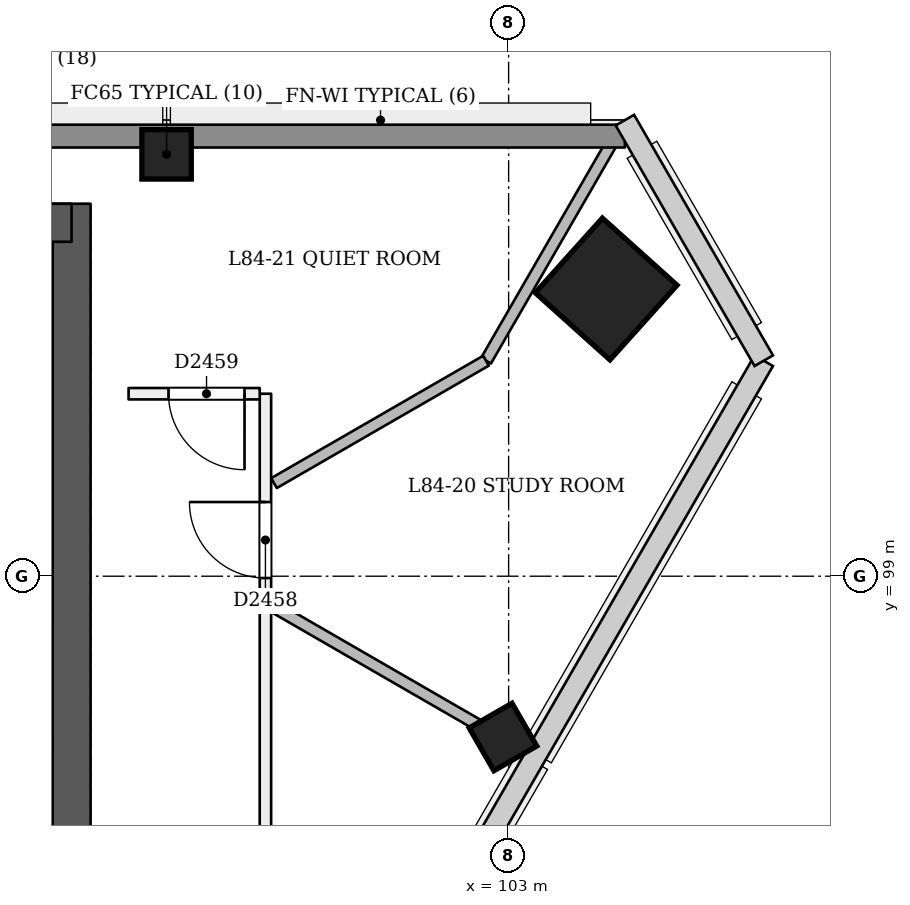
"""IFC4 building model, lengths in metres.
Left out: names, types, materials, properties, quantities, classifications, styles, units other than length and angle.
Written with IfcOpenShell. Run it as: python <this file> out.ifc"""

import sys

from ifc_helpers import new_model, si_unit, direction, frame, frame_2d, origin, origin_2d, place, context, subcontext, project, spatial, rectangle, extrude, element, fill, save


model = new_model("IFC4")
c1 = context("Model", 3, precision=1e-05, world=origin(), true_north=direction((0.0, 1.0)))
c2 = subcontext(c1, "Body", "Model", "MODEL_VIEW")
j1 = project(units=[si_unit("LENGTHUNIT", "METRE"), si_unit("PLANEANGLEUNIT", "RADIAN")], contexts=[c1])
p1 = place(None, origin())
s1 = spatial("IfcSite", under=j1, at=p1, CompositionType="ELEMENT")
p2 = place(p1, origin())
s2 = spatial("IfcBuilding", under=s1, at=p2, CompositionType="ELEMENT")
p3 = place(p2, frame((0.0, 0.0, 323.8)))
s3 = spatial("IfcBuildingStorey", under=s2, at=p3, CompositionType="ELEMENT", Elevation=323.8)
p4 = place(p3, frame((97.25, 93.15, 0.0), z_axis=(0.0, 0.0, 1.0), x_axis=(0.0, 1.0, 0.0)))
e1 = element("IfcWall", 1, at=p4, inside=s3, PredefinedType="SHEAR", context=c2, shape_type="SweptSolid", body=[
    extrude(rectangle(XDim=10.75, YDim=0.5, at=frame_2d((5.375, 0.0))), origin(), (0.0, 0.0, 1.0), 3.6),
])
p5 = place(p3, frame((97.25, 103.65, 0.0), z_axis=(0.0, 0.0, 1.0), x_axis=(-1.0, 0.0, 0.0)))
e2 = element("IfcWall", 2, at=p5, inside=s3, PredefinedType="SHEAR", context=c2, shape_type="SweptSolid", body=[
    extrude(rectangle(XDim=24.75, YDim=0.5, at=frame_2d((12.375, 0.0))), origin(), (0.0, 0.0, 1.0), 3.6),
])
p6 = place(p3, frame((104.317, 102.768, 0.0), z_axis=(-0.028403721265, 0.009287135593, 0.999553389135), x_axis=(0.498883786083, -0.866383840612, 0.022226306716)))
e3 = element("IfcColumn", 3, at=p6, inside=s3, PredefinedType="COLUMN", context=c2, shape_type="SweptSolid", body=[
    extrude(rectangle(XDim=1.32, YDim=1.32, at=origin_2d()), origin(), (0.0, 0.0, 1.0), 3.602),
])
p7 = place(p3, frame((98.5, 104.55, 0.0), z_axis=(0.0, 0.0, 1.0), x_axis=(1.0, 0.0, 0.0)))
e4 = element("IfcColumn", 4, at=p7, inside=s3, PredefinedType="COLUMN", context=c2, shape_type="SweptSolid", body=[
    extrude(rectangle(XDim=0.65, YDim=0.65, at=origin_2d()), origin(), (0.0, 0.0, 1.0), 3.6),
])
p8 = place(p3, frame((102.953, 96.838, -0.02), z_axis=(-0.02222134892, 0.038480872521, 0.999012229206), x_axis=(-0.500174592943, -0.865639497158, 0.022217955235)))
e5 = element("IfcColumn", 5, at=p8, inside=s3, PredefinedType="COLUMN", context=c2, shape_type="SweptSolid", body=[
    extrude(rectangle(XDim=0.65, YDim=0.65, at=origin_2d()), origin(), (0.0, 0.0, 1.0), 3.604),
])
p9 = place(p3, frame((99.8, 90.599, 0.0), z_axis=(0.0, 0.0, 1.0), x_axis=(4.5203869e-05, 0.999999998978, 0.0)))
e6 = element("IfcWall", 6, at=p9, inside=s3, PredefinedType="PARTITIONING", context=c2, shape_type="SweptSolid", body=[
    extrude(rectangle(XDim=10.802, YDim=0.15, at=frame_2d((5.401, 0.0))), origin(), (0.0, 0.0, 1.0), 2.7),
])
p10 = place(p9, frame((8.377, 0.0, 0.0)))
e7 = element("IfcOpeningElement", 7, at=p10, cuts=e6, PredefinedType="OPENING", context=c2, shape_type="SweptSolid", body=[
    extrude(rectangle(XDim=1.0, YDim=2.1, at=frame_2d((0.5, 1.05))), frame((0.0, 0.085, 0.0), z_axis=(0.0, -1.0, 0.0), x_axis=(1.0, 0.0, 0.0)), (0.0, 0.0, 1.0), 0.171),
])
p11 = place(p3, frame((99.726, 101.401, 0.0), z_axis=(0.0, 0.0, 1.0), x_axis=(-1.0, 0.0, 0.0)))
e8 = element("IfcWall", 8, at=p11, inside=s3, PredefinedType="PARTITIONING", context=c2, shape_type="SweptSolid", body=[
    extrude(rectangle(XDim=1.726, YDim=0.15, at=frame_2d((0.863, 0.0))), origin(), (0.0, 0.0, 1.0), 3.2),
])
p12 = place(p11, frame((0.2, 0.0, 0.0)))
e9 = element("IfcOpeningElement", 9, at=p12, cuts=e8, PredefinedType="OPENING", context=c2, shape_type="SweptSolid", body=[
    extrude(rectangle(XDim=1.0, YDim=2.1, at=frame_2d((0.5, 1.05))), frame((0.0, 0.085, 0.0), z_axis=(0.0, -1.0, 0.0), x_axis=(1.0, 0.0, 0.0)), (0.0, 0.0, 1.0), 0.171),
])
p13 = place(p3, frame((103.255, 96.664, 0.0), z_axis=(0.0, 0.0, 1.0), x_axis=(-0.866023354436, 0.500003549559, 0.0)))
e10 = element("IfcWall", 10, at=p13, inside=s3, PredefinedType="PARTITIONING", context=c2, shape_type="SweptSolid", body=[
    extrude(rectangle(XDim=3.859, YDim=0.15, at=frame_2d((1.93, 0.0))), origin(), (0.0, 0.0, 1.0), 2.7),
])
p14 = place(p3, frame((104.472, 104.9, 0.0), z_axis=(0.0, 0.0, 1.0), x_axis=(-0.499975270313, -0.866039681005, 0.0)))
e11 = element("IfcWall", 11, at=p14, inside=s3, PredefinedType="PARTITIONING", context=c2, shape_type="SweptSolid", body=[
    extrude(rectangle(XDim=3.539, YDim=0.15, at=frame_2d((1.77, 0.0))), origin(), (0.0, 0.0, 1.0), 2.7),
])
p15 = place(p3, frame((102.702, 101.835, 0.0), z_axis=(0.0, 0.0, 1.0), x_axis=(-0.86603284879, -0.49998710465, 0.0)))
e12 = element("IfcWall", 12, at=p15, inside=s3, PredefinedType="PARTITIONING", context=c2, shape_type="SweptSolid", body=[
    extrude(rectangle(XDim=3.221, YDim=0.15, at=frame_2d((1.61, 0.0))), origin(), (0.0, 0.0, 1.0), 3.2),
])
p16 = place(p3, frame((65.471, 104.79, 0.0), z_axis=(0.0, 0.0, 1.0), x_axis=(1.0, 0.0, 0.0)))
e13 = element("IfcWall", 13, at=p16, inside=s3, PredefinedType="SOLIDWALL", context=c2, shape_type="SweptSolid", body=[
    extrude(rectangle(XDim=39.059, YDim=0.3, at=frame_2d((19.529, 0.0))), origin(), (0.0, 0.0, 1.0), 2.7),
])
p17 = place(p10, origin())
e14 = element("IfcDoor", 14, at=p17, inside=s3, OperationType="SINGLE_SWING_RIGHT", PredefinedType="NOTDEFINED", context=c2, shape_type="SweptSolid", body=[
    extrude(rectangle(XDim=1.0, YDim=2.1, at=frame_2d((0.5, 1.05))), frame((0.0, 0.025, 0.0), z_axis=(0.0, -1.0, 0.0), x_axis=(1.0, 0.0, 0.0)), (0.0, 0.0, 1.0), 0.05),
])
fill(e7, e14)
p18 = place(p12, origin())
e15 = element("IfcDoor", 15, at=p18, inside=s3, OperationType="SINGLE_SWING_LEFT", PredefinedType="NOTDEFINED", context=c2, shape_type="SweptSolid", body=[
    extrude(rectangle(XDim=1.0, YDim=2.1, at=frame_2d((0.5, 1.05))), frame((0.0, 0.025, 0.0), z_axis=(0.0, -1.0, 0.0), x_axis=(1.0, 0.0, 0.0)), (0.0, 0.0, 1.0), 0.05),
])
fill(e9, e15)
save(model, sys.argv[1])
